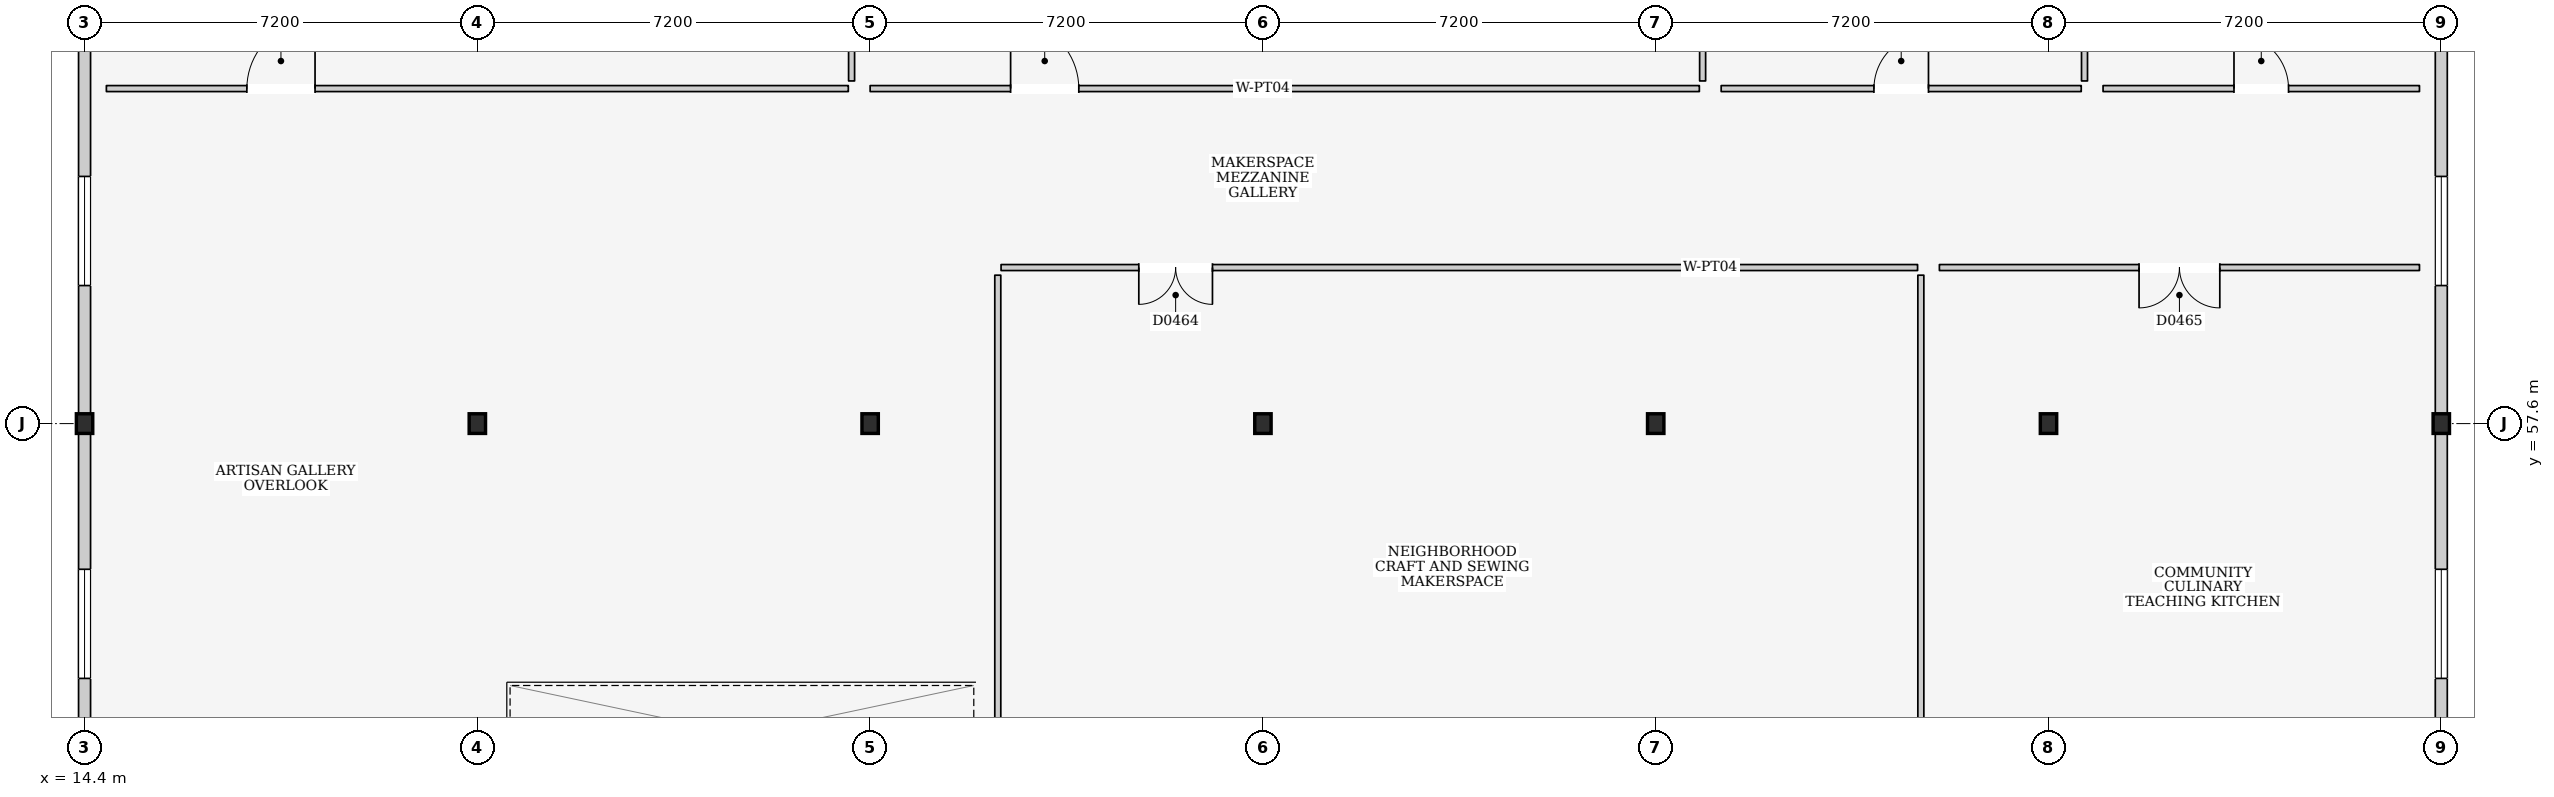
"""IFC4 building model, lengths in metres.
Left out: names, types, materials, properties, quantities, classifications, styles, units other than length and angle.
Written with IfcOpenShell. Run it as: python <this file> out.ifc"""

import sys

from ifc_helpers import new_model, si_unit, direction, frame, frame_2d, origin, origin_2d, place, context, subcontext, project, spatial, rectangle, i_section, extrude, element, fill, save


model = new_model("IFC4")
c1 = context("Model", 3, precision=1e-05, world=origin(), true_north=direction((0.0, 1.0)))
c2 = subcontext(c1, "Body", "Model", "MODEL_VIEW")
j1 = project(units=[si_unit("LENGTHUNIT", "METRE"), si_unit("PLANEANGLEUNIT", "RADIAN")], contexts=[c1])
p1 = place(None, origin())
s1 = spatial("IfcSite", under=j1, at=p1, CompositionType="ELEMENT")
p2 = place(p1, origin())
s2 = spatial("IfcBuilding", under=s1, at=p2, CompositionType="ELEMENT")
p3 = place(p2, frame((0.0, 0.0, 4.5)))
s3 = spatial("IfcBuildingStorey", under=s2, at=p3, CompositionType="ELEMENT", Elevation=4.5)
for number, where, z_axis, x_axis in (
    (1, (14.4, 57.6, 0.0), (0.0, 0.0, 1.0), (1.0, 0.0, 0.0)),
    (2, (21.6, 57.6, 0.0), (0.0, 0.0, 1.0), (1.0, 0.0, 0.0)),
    (3, (28.8, 57.6, 0.0), (0.0, 0.0, 1.0), (1.0, 0.0, 0.0)),
    (4, (36.0, 57.6, 0.0), (0.0, 0.0, 1.0), (1.0, 0.0, 0.0)),
    (5, (43.2, 57.6, 0.0), (0.0, 0.0, 1.0), (1.0, 0.0, 0.0)),
    (6, (50.4, 57.6, 0.0), (0.0, 0.0, 1.0), (1.0, 0.0, 0.0)),
    (7, (57.6, 57.6, 0.0), (0.0, 0.0, 1.0), (1.0, 0.0, 0.0)),
):
    element("IfcColumn", number, at=place(p3, frame(where, z_axis=z_axis, x_axis=x_axis)), inside=s3, PredefinedType="COLUMN", context=c2, shape_type="SweptSolid", body=[
        extrude(i_section(OverallWidth=0.3, OverallDepth=0.36, WebThickness=0.012, FlangeThickness=0.022, at=origin_2d()), origin(), (0.0, 0.0, 1.0), 4.5),
    ])
p4 = place(p3, frame((14.4, 50.58, 0.0), z_axis=(0.0, 0.0, 1.0), x_axis=(0.0, 1.0, 0.0)))
e8 = element("IfcWall", 8, at=p4, inside=s3, PredefinedType="ELEMENTEDWALL", context=c2, shape_type="SweptSolid", body=[
    extrude(rectangle(XDim=6.84, YDim=0.22, at=frame_2d((3.42, 0.0))), origin(), (0.0, 0.0, 1.0), 3.9),
])
p5 = place(p4, frame((2.35, 0.0, 0.95)))
e9 = element("IfcOpeningElement", 9, at=p5, cuts=e8, PredefinedType="OPENING", context=c2, shape_type="SweptSolid", body=[
    extrude(rectangle(XDim=2.0, YDim=1.5, at=frame_2d((1.0, 0.75))), frame((0.0, 0.125, 0.0), z_axis=(0.0, -1.0, 0.0), x_axis=(1.0, 0.0, 0.0)), (0.0, 0.0, 1.0), 0.25),
])
p6 = place(p3, frame((57.6, 50.58, 0.0), z_axis=(0.0, 0.0, 1.0), x_axis=(0.0, 1.0, 0.0)))
e10 = element("IfcWall", 10, at=p6, inside=s3, PredefinedType="ELEMENTEDWALL", context=c2, shape_type="SweptSolid", body=[
    extrude(rectangle(XDim=6.84, YDim=0.22, at=frame_2d((3.42, 0.0))), origin(), (0.0, 0.0, 1.0), 3.9),
])
p7 = place(p6, frame((2.35, 0.0, 0.95)))
e11 = element("IfcOpeningElement", 11, at=p7, cuts=e10, PredefinedType="OPENING", context=c2, shape_type="SweptSolid", body=[
    extrude(rectangle(XDim=2.0, YDim=1.5, at=frame_2d((1.0, 0.75))), frame((0.0, 0.125, 0.0), z_axis=(0.0, -1.0, 0.0), x_axis=(1.0, 0.0, 0.0)), (0.0, 0.0, 1.0), 0.25),
])
p8 = place(p3, frame((14.4, 57.78, 0.0), z_axis=(0.0, 0.0, 1.0), x_axis=(0.0, 1.0, 0.0)))
e12 = element("IfcWall", 12, at=p8, inside=s3, PredefinedType="ELEMENTEDWALL", context=c2, shape_type="SweptSolid", body=[
    extrude(rectangle(XDim=6.84, YDim=0.22, at=frame_2d((3.42, 0.0))), origin(), (0.0, 0.0, 1.0), 3.9),
])
p9 = place(p8, frame((2.35, 0.0, 0.95)))
e13 = element("IfcOpeningElement", 13, at=p9, cuts=e12, PredefinedType="OPENING", context=c2, shape_type="SweptSolid", body=[
    extrude(rectangle(XDim=2.0, YDim=1.5, at=frame_2d((1.0, 0.75))), frame((0.0, 0.125, 0.0), z_axis=(0.0, -1.0, 0.0), x_axis=(1.0, 0.0, 0.0)), (0.0, 0.0, 1.0), 0.25),
])
p10 = place(p3, frame((57.6, 57.78, 0.0), z_axis=(0.0, 0.0, 1.0), x_axis=(0.0, 1.0, 0.0)))
e14 = element("IfcWall", 14, at=p10, inside=s3, PredefinedType="ELEMENTEDWALL", context=c2, shape_type="SweptSolid", body=[
    extrude(rectangle(XDim=6.84, YDim=0.22, at=frame_2d((3.42, 0.0))), origin(), (0.0, 0.0, 1.0), 3.9),
])
p11 = place(p10, frame((2.35, 0.0, 0.95)))
e15 = element("IfcOpeningElement", 15, at=p11, cuts=e14, PredefinedType="OPENING", context=c2, shape_type="SweptSolid", body=[
    extrude(rectangle(XDim=2.0, YDim=1.5, at=frame_2d((1.0, 0.75))), frame((0.0, 0.125, 0.0), z_axis=(0.0, -1.0, 0.0), x_axis=(1.0, 0.0, 0.0)), (0.0, 0.0, 1.0), 0.25),
])
p12 = place(p3, frame((31.2, 60.46, 0.0), z_axis=(0.0, 0.0, 1.0), x_axis=(1.0, 0.0, 0.0)))
e16 = element("IfcWall", 16, at=p12, inside=s3, PredefinedType="PARTITIONING", context=c2, shape_type="SweptSolid", body=[
    extrude(rectangle(XDim=16.8, YDim=0.11, at=frame_2d((8.4, 0.0))), origin(), (0.0, 0.0, 1.0), 4.25),
])
p13 = place(p12, frame((2.525, 0.0, 0.0)))
e17 = element("IfcOpeningElement", 17, at=p13, cuts=e16, PredefinedType="OPENING", context=c2, shape_type="SweptSolid", body=[
    extrude(rectangle(XDim=1.35, YDim=2.3, at=frame_2d((0.675, 1.15))), frame((0.0, 0.07, 0.0), z_axis=(0.0, -1.0, 0.0), x_axis=(1.0, 0.0, 0.0)), (0.0, 0.0, 1.0), 0.14),
])
for number, where, z_axis, x_axis in (
    (18, (31.14, 50.88, 0.0), (0.0, 0.0, 1.0), (0.0, 1.0, 0.0)),
    (19, (48.06, 50.88, 0.0), (0.0, 0.0, 1.0), (0.0, 1.0, 0.0)),
):
    element("IfcWall", number, at=place(p3, frame(where, z_axis=z_axis, x_axis=x_axis)), inside=s3, PredefinedType="PARTITIONING", context=c2, shape_type="SweptSolid", body=[
        extrude(rectangle(XDim=9.44, YDim=0.11, at=frame_2d((4.72, 0.0))), origin(), (0.0, 0.0, 1.0), 4.25),
    ])
p14 = place(p3, frame((48.4, 60.46, 0.0), z_axis=(0.0, 0.0, 1.0), x_axis=(1.0, 0.0, 0.0)))
e20 = element("IfcWall", 20, at=p14, inside=s3, PredefinedType="PARTITIONING", context=c2, shape_type="SweptSolid", body=[
    extrude(rectangle(XDim=8.8, YDim=0.11, at=frame_2d((4.4, 0.0))), origin(), (0.0, 0.0, 1.0), 4.25),
])
p15 = place(p14, frame((3.66, 0.0, 0.0)))
e21 = element("IfcOpeningElement", 21, at=p15, cuts=e20, PredefinedType="OPENING", context=c2, shape_type="SweptSolid", body=[
    extrude(rectangle(XDim=1.48, YDim=2.3, at=frame_2d((0.74, 1.15))), frame((0.0, 0.07, 0.0), z_axis=(0.0, -1.0, 0.0), x_axis=(1.0, 0.0, 0.0)), (0.0, 0.0, 1.0), 0.14),
])
p16 = place(p3, frame((14.8, 63.74, 0.0), z_axis=(0.0, 0.0, 1.0), x_axis=(1.0, 0.0, 0.0)))
e22 = element("IfcWall", 22, at=p16, inside=s3, PredefinedType="PARTITIONING", context=c2, shape_type="SweptSolid", body=[
    extrude(rectangle(XDim=13.6, YDim=0.11, at=frame_2d((6.8, 0.0))), origin(), (0.0, 0.0, 1.0), 4.25),
])
p17 = place(p16, frame((2.575, 0.0, 0.0)))
e23 = element("IfcOpeningElement", 23, at=p17, cuts=e22, PredefinedType="OPENING", context=c2, shape_type="SweptSolid", body=[
    extrude(rectangle(XDim=1.25, YDim=2.25, at=frame_2d((0.625, 1.125))), frame((0.0, 0.07, 0.0), z_axis=(0.0, -1.0, 0.0), x_axis=(1.0, 0.0, 0.0)), (0.0, 0.0, 1.0), 0.14),
])
p18 = place(p3, frame((28.46, 63.88, 0.0), z_axis=(0.0, 0.0, 1.0), x_axis=(0.0, 1.0, 0.0)))
e24 = element("IfcWall", 24, at=p18, inside=s3, PredefinedType="PARTITIONING", context=c2, shape_type="SweptSolid", body=[
    extrude(rectangle(XDim=7.44, YDim=0.11, at=frame_2d((3.72, 0.0))), origin(), (0.0, 0.0, 1.0), 4.25),
])
p19 = place(p3, frame((28.8, 63.74, 0.0), z_axis=(0.0, 0.0, 1.0), x_axis=(1.0, 0.0, 0.0)))
e25 = element("IfcWall", 25, at=p19, inside=s3, PredefinedType="PARTITIONING", context=c2, shape_type="SweptSolid", body=[
    extrude(rectangle(XDim=15.2, YDim=0.11, at=frame_2d((7.6, 0.0))), origin(), (0.0, 0.0, 1.0), 4.25),
])
p20 = place(p19, frame((2.575, 0.0, 0.0)))
e26 = element("IfcOpeningElement", 26, at=p20, cuts=e25, PredefinedType="OPENING", context=c2, shape_type="SweptSolid", body=[
    extrude(rectangle(XDim=1.25, YDim=2.25, at=frame_2d((0.625, 1.125))), frame((0.0, 0.07, 0.0), z_axis=(0.0, -1.0, 0.0), x_axis=(1.0, 0.0, 0.0)), (0.0, 0.0, 1.0), 0.14),
])
p21 = place(p3, frame((44.06, 63.88, 0.0), z_axis=(0.0, 0.0, 1.0), x_axis=(0.0, 1.0, 0.0)))
e27 = element("IfcWall", 27, at=p21, inside=s3, PredefinedType="PARTITIONING", context=c2, shape_type="SweptSolid", body=[
    extrude(rectangle(XDim=7.44, YDim=0.11, at=frame_2d((3.72, 0.0))), origin(), (0.0, 0.0, 1.0), 4.25),
])
p22 = place(p3, frame((44.4, 63.74, 0.0), z_axis=(0.0, 0.0, 1.0), x_axis=(1.0, 0.0, 0.0)))
e28 = element("IfcWall", 28, at=p22, inside=s3, PredefinedType="PARTITIONING", context=c2, shape_type="SweptSolid", body=[
    extrude(rectangle(XDim=6.6, YDim=0.11, at=frame_2d((3.3, 0.0))), origin(), (0.0, 0.0, 1.0), 4.25),
])
p23 = place(p22, frame((2.8, 0.0, 0.0)))
e29 = element("IfcOpeningElement", 29, at=p23, cuts=e28, PredefinedType="OPENING", context=c2, shape_type="SweptSolid", body=[
    extrude(rectangle(XDim=1.0, YDim=2.1, at=frame_2d((0.5, 1.05))), frame((0.0, 0.07, 0.0), z_axis=(0.0, -1.0, 0.0), x_axis=(1.0, 0.0, 0.0)), (0.0, 0.0, 1.0), 0.14),
])
p24 = place(p3, frame((51.06, 63.88, 0.0), z_axis=(0.0, 0.0, 1.0), x_axis=(0.0, 1.0, 0.0)))
e30 = element("IfcWall", 30, at=p24, inside=s3, PredefinedType="PARTITIONING", context=c2, shape_type="SweptSolid", body=[
    extrude(rectangle(XDim=7.44, YDim=0.11, at=frame_2d((3.72, 0.0))), origin(), (0.0, 0.0, 1.0), 4.25),
])
p25 = place(p3, frame((51.4, 63.74, 0.0), z_axis=(0.0, 0.0, 1.0), x_axis=(1.0, 0.0, 0.0)))
e31 = element("IfcWall", 31, at=p25, inside=s3, PredefinedType="PARTITIONING", context=c2, shape_type="SweptSolid", body=[
    extrude(rectangle(XDim=5.8, YDim=0.11, at=frame_2d((2.9, 0.0))), origin(), (0.0, 0.0, 1.0), 4.25),
])
p26 = place(p25, frame((2.4, 0.0, 0.0)))
e32 = element("IfcOpeningElement", 32, at=p26, cuts=e31, PredefinedType="OPENING", context=c2, shape_type="SweptSolid", body=[
    extrude(rectangle(XDim=1.0, YDim=2.1, at=frame_2d((0.5, 1.05))), frame((0.0, 0.07, 0.0), z_axis=(0.0, -1.0, 0.0), x_axis=(1.0, 0.0, 0.0)), (0.0, 0.0, 1.0), 0.14),
])
p27 = place(p5, origin())
e33 = element("IfcWindow", 33, at=p27, inside=s3, PartitioningType="DOUBLE_PANEL_VERTICAL", PredefinedType="WINDOW", context=c2, shape_type="SweptSolid", body=[
    extrude(rectangle(XDim=2.0, YDim=1.5, at=frame_2d((1.0, 0.75))), frame((0.0, 0.03, 0.0), z_axis=(0.0, -1.0, 0.0), x_axis=(1.0, 0.0, 0.0)), (0.0, 0.0, 1.0), 0.06),
])
fill(e9, e33)
p28 = place(p7, origin())
e34 = element("IfcWindow", 34, at=p28, inside=s3, PartitioningType="DOUBLE_PANEL_VERTICAL", PredefinedType="WINDOW", context=c2, shape_type="SweptSolid", body=[
    extrude(rectangle(XDim=2.0, YDim=1.5, at=frame_2d((1.0, 0.75))), frame((0.0, 0.03, 0.0), z_axis=(0.0, -1.0, 0.0), x_axis=(1.0, 0.0, 0.0)), (0.0, 0.0, 1.0), 0.06),
])
fill(e11, e34)
p29 = place(p9, origin())
e35 = element("IfcWindow", 35, at=p29, inside=s3, PartitioningType="DOUBLE_PANEL_VERTICAL", PredefinedType="WINDOW", context=c2, shape_type="SweptSolid", body=[
    extrude(rectangle(XDim=2.0, YDim=1.5, at=frame_2d((1.0, 0.75))), frame((0.0, 0.03, 0.0), z_axis=(0.0, -1.0, 0.0), x_axis=(1.0, 0.0, 0.0)), (0.0, 0.0, 1.0), 0.06),
])
fill(e13, e35)
p30 = place(p11, origin())
e36 = element("IfcWindow", 36, at=p30, inside=s3, PartitioningType="DOUBLE_PANEL_VERTICAL", PredefinedType="WINDOW", context=c2, shape_type="SweptSolid", body=[
    extrude(rectangle(XDim=2.0, YDim=1.5, at=frame_2d((1.0, 0.75))), frame((0.0, 0.03, 0.0), z_axis=(0.0, -1.0, 0.0), x_axis=(1.0, 0.0, 0.0)), (0.0, 0.0, 1.0), 0.06),
])
fill(e15, e36)
p31 = place(p13, frame((1.35, 0.0, 0.0), z_axis=(0.0, 0.0, 1.0), x_axis=(-1.0, 0.0, 0.0)))
e37 = element("IfcDoor", 37, at=p31, inside=s3, OperationType="DOUBLE_DOOR_SINGLE_SWING", PredefinedType="DOOR", context=c2, shape_type="SweptSolid", body=[
    extrude(rectangle(XDim=1.35, YDim=2.3, at=frame_2d((0.675, 1.15))), frame((0.0, 0.025, 0.0), z_axis=(0.0, -1.0, 0.0), x_axis=(1.0, 0.0, 0.0)), (0.0, 0.0, 1.0), 0.05),
])
fill(e17, e37)
p32 = place(p15, frame((1.48, 0.0, 0.0), z_axis=(0.0, 0.0, 1.0), x_axis=(-1.0, 0.0, 0.0)))
e38 = element("IfcDoor", 38, at=p32, inside=s3, OperationType="DOUBLE_DOOR_SINGLE_SWING", PredefinedType="DOOR", context=c2, shape_type="SweptSolid", body=[
    extrude(rectangle(XDim=1.48, YDim=2.3, at=frame_2d((0.74, 1.15))), frame((0.0, 0.025, 0.0), z_axis=(0.0, -1.0, 0.0), x_axis=(1.0, 0.0, 0.0)), (0.0, 0.0, 1.0), 0.05),
])
fill(e21, e38)
p33 = place(p17, origin())
e39 = element("IfcDoor", 39, at=p33, inside=s3, OperationType="SINGLE_SWING_RIGHT", PredefinedType="DOOR", context=c2, shape_type="SweptSolid", body=[
    extrude(rectangle(XDim=1.25, YDim=2.25, at=frame_2d((0.625, 1.125))), frame((0.0, 0.025, 0.0), z_axis=(0.0, -1.0, 0.0), x_axis=(1.0, 0.0, 0.0)), (0.0, 0.0, 1.0), 0.05),
])
fill(e23, e39)
p34 = place(p20, origin())
e40 = element("IfcDoor", 40, at=p34, inside=s3, OperationType="SINGLE_SWING_LEFT", PredefinedType="DOOR", context=c2, shape_type="SweptSolid", body=[
    extrude(rectangle(XDim=1.25, YDim=2.25, at=frame_2d((0.625, 1.125))), frame((0.0, 0.025, 0.0), z_axis=(0.0, -1.0, 0.0), x_axis=(1.0, 0.0, 0.0)), (0.0, 0.0, 1.0), 0.05),
])
fill(e26, e40)
p35 = place(p23, origin())
e41 = element("IfcDoor", 41, at=p35, inside=s3, OperationType="SINGLE_SWING_RIGHT", PredefinedType="DOOR", context=c2, shape_type="SweptSolid", body=[
    extrude(rectangle(XDim=1.0, YDim=2.1, at=frame_2d((0.5, 1.05))), frame((0.0, 0.025, 0.0), z_axis=(0.0, -1.0, 0.0), x_axis=(1.0, 0.0, 0.0)), (0.0, 0.0, 1.0), 0.05),
])
fill(e29, e41)
p36 = place(p26, origin())
e42 = element("IfcDoor", 42, at=p36, inside=s3, OperationType="SINGLE_SWING_LEFT", PredefinedType="DOOR", context=c2, shape_type="SweptSolid", body=[
    extrude(rectangle(XDim=1.0, YDim=2.1, at=frame_2d((0.5, 1.05))), frame((0.0, 0.025, 0.0), z_axis=(0.0, -1.0, 0.0), x_axis=(1.0, 0.0, 0.0)), (0.0, 0.0, 1.0), 0.05),
])
fill(e32, e42)
save(model, sys.argv[1])
